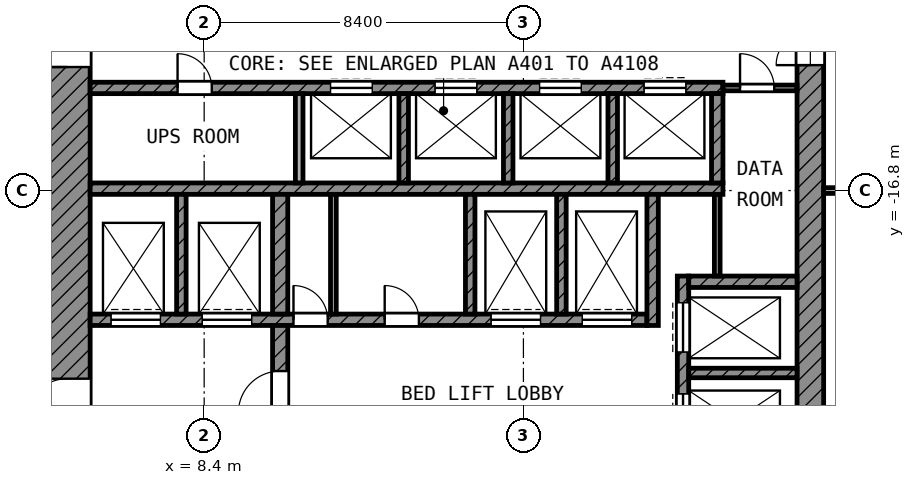
"""IFC4 building model, lengths in metres.
Left out: names, types, materials, properties, quantities, classifications, styles, units other than length and angle.
Written with IfcOpenShell. Run it as: python <this file> out.ifc"""

import sys

from ifc_helpers import new_model, si_unit, direction, frame, frame_2d, origin, place, context, subcontext, project, spatial, rectangle, extrude, element, fill, save


model = new_model("IFC4")
c1 = context("Model", 3, precision=1e-05, world=origin(), true_north=direction((0.0, 1.0)))
c2 = subcontext(c1, "Body", "Model", "MODEL_VIEW")
j1 = project(units=[si_unit("LENGTHUNIT", "METRE"), si_unit("PLANEANGLEUNIT", "RADIAN")], contexts=[c1])
p1 = place(None, origin())
s1 = spatial("IfcSite", under=j1, at=p1, CompositionType="ELEMENT")
p2 = place(p1, origin())
s2 = spatial("IfcBuilding", under=s1, at=p2, CompositionType="ELEMENT")
p3 = place(p2, frame((0.0, 0.0, 319.6)))
s3 = spatial("IfcBuildingStorey", under=s2, at=p3, CompositionType="ELEMENT", Elevation=319.6)
p4 = place(p3, frame((4.8, -24.7, 0.0), z_axis=(0.0, 0.0, 1.0), x_axis=(0.0, 1.0, 0.0)))
e1 = element("IfcWall", 1, at=p4, inside=s3, PredefinedType="SHEAR", context=c2, shape_type="SweptSolid", body=[
    extrude(rectangle(XDim=19.3, YDim=1.2, at=frame_2d((9.65, 0.0))), origin(), (0.0, 0.0, 1.0), 3.6),
])
p5 = place(p4, frame((11.15, 0.0, 0.0)))
e2 = element("IfcOpeningElement", 2, at=p5, cuts=e1, PredefinedType="OPENING", context=c2, shape_type="SweptSolid", body=[
    extrude(rectangle(XDim=1.1, YDim=2.1, at=frame_2d((0.55, 1.05))), frame((0.0, 0.61, 0.0), z_axis=(0.0, -1.0, 0.0), x_axis=(1.0, 0.0, 0.0)), (0.0, 0.0, 1.0), 1.22),
])
p6 = place(p4, frame((1.85, 0.0, 0.0)))
e3 = element("IfcOpeningElement", 3, at=p6, cuts=e1, PredefinedType="OPENING", context=c2, shape_type="SweptSolid", body=[
    extrude(rectangle(XDim=1.1, YDim=2.1, at=frame_2d((0.55, 1.05))), frame((0.0, 0.61, 0.0), z_axis=(0.0, -1.0, 0.0), x_axis=(1.0, 0.0, 0.0)), (0.0, 0.0, 1.0), 1.22),
])
p7 = place(p3, frame((24.35, -24.0, 0.0), z_axis=(0.0, 0.0, 1.0), x_axis=(0.0, 1.0, 0.0)))
e4 = element("IfcWall", 4, at=p7, inside=s3, PredefinedType="SHEAR", context=c2, shape_type="SweptSolid", body=[
    extrude(rectangle(XDim=18.6, YDim=0.7, at=frame_2d((9.3, 0.0))), origin(), (0.0, 0.0, 1.0), 3.6),
])
p8 = place(p7, frame((10.5, 0.0, 0.0)))
e5 = element("IfcOpeningElement", 5, at=p8, cuts=e4, PredefinedType="OPENING", context=c2, shape_type="SweptSolid", body=[
    extrude(rectangle(XDim=1.8, YDim=2.1, at=frame_2d((0.9, 1.05))), frame((0.0, 0.36, 0.0), z_axis=(0.0, -1.0, 0.0), x_axis=(1.0, 0.0, 0.0)), (0.0, 0.0, 1.0), 0.72),
])
p9 = place(p3, frame((5.4, -14.1, 0.0), z_axis=(0.0, 0.0, 1.0), x_axis=(1.0, 0.0, 0.0)))
e6 = element("IfcWall", 6, at=p9, inside=s3, PredefinedType="SHEAR", context=c2, shape_type="SweptSolid", body=[
    extrude(rectangle(XDim=16.65, YDim=0.3, at=frame_2d((8.325, 0.0))), origin(), (0.0, 0.0, 1.0), 3.6),
])
p10 = place(p9, frame((6.325, 0.0, 0.0)))
e7 = element("IfcOpeningElement", 7, at=p10, cuts=e6, PredefinedType="OPENING", context=c2, shape_type="SweptSolid", body=[
    extrude(rectangle(XDim=1.1, YDim=2.1, at=frame_2d((0.55, 1.05))), frame((0.0, 0.16, 0.0), z_axis=(0.0, -1.0, 0.0), x_axis=(1.0, 0.0, 0.0)), (0.0, 0.0, 1.0), 0.32),
])
p11 = place(p9, frame((9.075, 0.0, 0.0)))
e8 = element("IfcOpeningElement", 8, at=p11, cuts=e6, PredefinedType="OPENING", context=c2, shape_type="SweptSolid", body=[
    extrude(rectangle(XDim=1.1, YDim=2.1, at=frame_2d((0.55, 1.05))), frame((0.0, 0.16, 0.0), z_axis=(0.0, -1.0, 0.0), x_axis=(1.0, 0.0, 0.0)), (0.0, 0.0, 1.0), 0.32),
])
p12 = place(p9, frame((11.825, 0.0, 0.0)))
e9 = element("IfcOpeningElement", 9, at=p12, cuts=e6, PredefinedType="OPENING", context=c2, shape_type="SweptSolid", body=[
    extrude(rectangle(XDim=1.1, YDim=2.1, at=frame_2d((0.55, 1.05))), frame((0.0, 0.16, 0.0), z_axis=(0.0, -1.0, 0.0), x_axis=(1.0, 0.0, 0.0)), (0.0, 0.0, 1.0), 0.32),
])
p13 = place(p9, frame((14.575, 0.0, 0.0)))
e10 = element("IfcOpeningElement", 10, at=p13, cuts=e6, PredefinedType="OPENING", context=c2, shape_type="SweptSolid", body=[
    extrude(rectangle(XDim=1.1, YDim=2.1, at=frame_2d((0.55, 1.05))), frame((0.0, 0.16, 0.0), z_axis=(0.0, -1.0, 0.0), x_axis=(1.0, 0.0, 0.0)), (0.0, 0.0, 1.0), 0.32),
])
p14 = place(p9, frame((2.3, 0.0, 0.0)))
e11 = element("IfcOpeningElement", 11, at=p14, cuts=e6, PredefinedType="OPENING", context=c2, shape_type="SweptSolid", body=[
    extrude(rectangle(XDim=0.9, YDim=2.1, at=frame_2d((0.45, 1.05))), frame((0.0, 0.16, 0.0), z_axis=(0.0, -1.0, 0.0), x_axis=(1.0, 0.0, 0.0)), (0.0, 0.0, 1.0), 0.32),
])
p15 = place(p3, frame((5.4, -16.75, 0.0), z_axis=(0.0, 0.0, 1.0), x_axis=(1.0, 0.0, 0.0)))
e12 = element("IfcWall", 12, at=p15, inside=s3, PredefinedType="SHEAR", context=c2, shape_type="SweptSolid", body=[
    extrude(rectangle(XDim=16.65, YDim=0.3, at=frame_2d((8.325, 0.0))), origin(), (0.0, 0.0, 1.0), 3.6),
])
p16 = place(p3, frame((5.4, -20.2, 0.0), z_axis=(0.0, 0.0, 1.0), x_axis=(1.0, 0.0, 0.0)))
e13 = element("IfcWall", 13, at=p16, inside=s3, PredefinedType="SHEAR", context=c2, shape_type="SweptSolid", body=[
    extrude(rectangle(XDim=14.65, YDim=0.3, at=frame_2d((7.325, 0.0))), origin(), (0.0, 0.0, 1.0), 3.6),
])
p17 = place(p16, frame((10.55, 0.0, 0.0)))
e14 = element("IfcOpeningElement", 14, at=p17, cuts=e13, PredefinedType="OPENING", context=c2, shape_type="SweptSolid", body=[
    extrude(rectangle(XDim=1.3, YDim=2.1, at=frame_2d((0.65, 1.05))), frame((0.0, 0.16, 0.0), z_axis=(0.0, -1.0, 0.0), x_axis=(1.0, 0.0, 0.0)), (0.0, 0.0, 1.0), 0.32),
])
p18 = place(p16, frame((12.95, 0.0, 0.0)))
e15 = element("IfcOpeningElement", 15, at=p18, cuts=e13, PredefinedType="OPENING", context=c2, shape_type="SweptSolid", body=[
    extrude(rectangle(XDim=1.3, YDim=2.1, at=frame_2d((0.65, 1.05))), frame((0.0, 0.16, 0.0), z_axis=(0.0, -1.0, 0.0), x_axis=(1.0, 0.0, 0.0)), (0.0, 0.0, 1.0), 0.32),
])
p19 = place(p16, frame((0.55, 0.0, 0.0)))
e16 = element("IfcOpeningElement", 16, at=p19, cuts=e13, PredefinedType="OPENING", context=c2, shape_type="SweptSolid", body=[
    extrude(rectangle(XDim=1.3, YDim=2.1, at=frame_2d((0.65, 1.05))), frame((0.0, 0.16, 0.0), z_axis=(0.0, -1.0, 0.0), x_axis=(1.0, 0.0, 0.0)), (0.0, 0.0, 1.0), 0.32),
])
p20 = place(p16, frame((2.95, 0.0, 0.0)))
e17 = element("IfcOpeningElement", 17, at=p20, cuts=e13, PredefinedType="OPENING", context=c2, shape_type="SweptSolid", body=[
    extrude(rectangle(XDim=1.3, YDim=2.1, at=frame_2d((0.65, 1.05))), frame((0.0, 0.16, 0.0), z_axis=(0.0, -1.0, 0.0), x_axis=(1.0, 0.0, 0.0)), (0.0, 0.0, 1.0), 0.32),
])
p21 = place(p16, frame((5.35, 0.0, 0.0)))
e18 = element("IfcOpeningElement", 18, at=p21, cuts=e13, PredefinedType="OPENING", context=c2, shape_type="SweptSolid", body=[
    extrude(rectangle(XDim=0.9, YDim=2.1, at=frame_2d((0.45, 1.05))), frame((0.0, 0.16, 0.0), z_axis=(0.0, -1.0, 0.0), x_axis=(1.0, 0.0, 0.0)), (0.0, 0.0, 1.0), 0.32),
])
p22 = place(p16, frame((7.75, 0.0, 0.0)))
e19 = element("IfcOpeningElement", 19, at=p22, cuts=e13, PredefinedType="OPENING", context=c2, shape_type="SweptSolid", body=[
    extrude(rectangle(XDim=0.9, YDim=2.1, at=frame_2d((0.45, 1.05))), frame((0.0, 0.16, 0.0), z_axis=(0.0, -1.0, 0.0), x_axis=(1.0, 0.0, 0.0)), (0.0, 0.0, 1.0), 0.32),
])
p23 = place(p3, frame((10.4, -24.0, 0.0), z_axis=(0.0, 0.0, 1.0), x_axis=(0.0, 1.0, 0.0)))
e20 = element("IfcWall", 20, at=p23, inside=s3, PredefinedType="SHEAR", context=c2, shape_type="SweptSolid", body=[
    extrude(rectangle(XDim=3.65, YDim=0.4, at=frame_2d((1.825, 0.0))), origin(), (0.0, 0.0, 1.0), 3.6),
])
p24 = place(p23, frame((1.35, 0.0, 0.0)))
e21 = element("IfcOpeningElement", 21, at=p24, cuts=e20, PredefinedType="OPENING", context=c2, shape_type="SweptSolid", body=[
    extrude(rectangle(XDim=1.1, YDim=2.1, at=frame_2d((0.55, 1.05))), frame((0.0, 0.21, 0.0), z_axis=(0.0, -1.0, 0.0), x_axis=(1.0, 0.0, 0.0)), (0.0, 0.0, 1.0), 0.42),
])
p25 = place(p3, frame((10.4, -20.05, 0.0), z_axis=(0.0, 0.0, 1.0), x_axis=(0.0, 1.0, 0.0)))
e22 = element("IfcWall", 22, at=p25, inside=s3, PredefinedType="SHEAR", context=c2, shape_type="SweptSolid", body=[
    extrude(rectangle(XDim=3.15, YDim=0.4, at=frame_2d((1.575, 0.0))), origin(), (0.0, 0.0, 1.0), 3.6),
])
p26 = place(p3, frame((20.2, -20.35, 0.0), z_axis=(0.0, 0.0, 1.0), x_axis=(0.0, 1.0, 0.0)))
e23 = element("IfcWall", 23, at=p26, inside=s3, PredefinedType="SHEAR", context=c2, shape_type="SweptSolid", body=[
    extrude(rectangle(XDim=3.45, YDim=0.3, at=frame_2d((1.725, 0.0))), origin(), (0.0, 0.0, 1.0), 3.6),
])
p27 = place(p3, frame((21.9, -16.6, 0.0), z_axis=(0.0, 0.0, 1.0), x_axis=(0.0, 1.0, 0.0)))
e24 = element("IfcWall", 24, at=p27, inside=s3, PredefinedType="SHEAR", context=c2, shape_type="SweptSolid", body=[
    extrude(rectangle(XDim=2.35, YDim=0.3, at=frame_2d((1.175, 0.0))), origin(), (0.0, 0.0, 1.0), 3.6),
])
p28 = place(p3, frame((21.15, -19.2, 0.0), z_axis=(0.0, 0.0, 1.0), x_axis=(1.0, 0.0, 0.0)))
e25 = element("IfcWall", 25, at=p28, inside=s3, PredefinedType="SHEAR", context=c2, shape_type="SweptSolid", body=[
    extrude(rectangle(XDim=2.85, YDim=0.3, at=frame_2d((1.425, 0.0))), origin(), (0.0, 0.0, 1.0), 3.6),
])
p29 = place(p3, frame((21.0, -24.0, 0.0), z_axis=(0.0, 0.0, 1.0), x_axis=(0.0, 1.0, 0.0)))
e26 = element("IfcWall", 26, at=p29, inside=s3, PredefinedType="SHEAR", context=c2, shape_type="SweptSolid", body=[
    extrude(rectangle(XDim=4.95, YDim=0.3, at=frame_2d((2.475, 0.0))), origin(), (0.0, 0.0, 1.0), 3.6),
])
p30 = place(p29, frame((2.95, 0.0, 0.0)))
e27 = element("IfcOpeningElement", 27, at=p30, cuts=e26, PredefinedType="OPENING", context=c2, shape_type="SweptSolid", body=[
    extrude(rectangle(XDim=1.3, YDim=2.1, at=frame_2d((0.65, 1.05))), frame((0.0, 0.16, 0.0), z_axis=(0.0, -1.0, 0.0), x_axis=(1.0, 0.0, 0.0)), (0.0, 0.0, 1.0), 0.32),
])
p31 = place(p29, frame((0.55, 0.0, 0.0)))
e28 = element("IfcOpeningElement", 28, at=p31, cuts=e26, PredefinedType="OPENING", context=c2, shape_type="SweptSolid", body=[
    extrude(rectangle(XDim=1.3, YDim=2.1, at=frame_2d((0.65, 1.05))), frame((0.0, 0.16, 0.0), z_axis=(0.0, -1.0, 0.0), x_axis=(1.0, 0.0, 0.0)), (0.0, 0.0, 1.0), 0.32),
])
p32 = place(p3, frame((21.15, -21.6, 0.0), z_axis=(0.0, 0.0, 1.0), x_axis=(1.0, 0.0, 0.0)))
e29 = element("IfcWall", 29, at=p32, inside=s3, PredefinedType="SHEAR", context=c2, shape_type="SweptSolid", body=[
    extrude(rectangle(XDim=2.85, YDim=0.25, at=frame_2d((1.425, 0.0))), origin(), (0.0, 0.0, 1.0), 3.6),
])
for number, where, z_axis, x_axis in (
    (30, (7.8, -20.05, 0.0), (0.0, 0.0, 1.0), (0.0, 1.0, 0.0)),
    (31, (15.4, -20.05, 0.0), (0.0, 0.0, 1.0), (0.0, 1.0, 0.0)),
    (32, (17.8, -20.05, 0.0), (0.0, 0.0, 1.0), (0.0, 1.0, 0.0)),
):
    element("IfcWall", number, at=place(p3, frame(where, z_axis=z_axis, x_axis=x_axis)), inside=s3, PredefinedType="SHEAR", context=c2, shape_type="SweptSolid", body=[
        extrude(rectangle(XDim=3.15, YDim=0.25, at=frame_2d((1.575, 0.0))), origin(), (0.0, 0.0, 1.0), 3.6),
    ])
p33 = place(p3, frame((10.9, -16.6, 0.0), z_axis=(0.0, 0.0, 1.0), x_axis=(0.0, 1.0, 0.0)))
e33 = element("IfcWall", 33, at=p33, inside=s3, PredefinedType="PARTITIONING", context=c2, shape_type="SweptSolid", body=[
    extrude(rectangle(XDim=2.35, YDim=0.2, at=frame_2d((1.175, 0.0))), origin(), (0.0, 0.0, 1.0), 3.6),
])
for number, where, z_axis, x_axis in (
    (34, (13.65, -16.6, 0.0), (0.0, 0.0, 1.0), (0.0, 1.0, 0.0)),
    (35, (16.4, -16.6, 0.0), (0.0, 0.0, 1.0), (0.0, 1.0, 0.0)),
    (36, (19.15, -16.6, 0.0), (0.0, 0.0, 1.0), (0.0, 1.0, 0.0)),
):
    element("IfcWall", number, at=place(p3, frame(where, z_axis=z_axis, x_axis=x_axis)), inside=s3, PredefinedType="SHEAR", context=c2, shape_type="SweptSolid", body=[
        extrude(rectangle(XDim=2.35, YDim=0.25, at=frame_2d((1.175, 0.0))), origin(), (0.0, 0.0, 1.0), 3.6),
    ])
p34 = place(p3, frame((21.9, -19.05, 0.0), z_axis=(0.0, 0.0, 1.0), x_axis=(0.0, 1.0, 0.0)))
e37 = element("IfcWall", 37, at=p34, inside=s3, PredefinedType="PARTITIONING", context=c2, shape_type="SweptSolid", body=[
    extrude(rectangle(XDim=2.15, YDim=0.15, at=frame_2d((1.075, 0.0))), origin(), (0.0, 0.0, 1.0), 3.6),
])
p35 = place(p3, frame((22.05, -14.1, 0.0), z_axis=(0.0, 0.0, 1.0), x_axis=(1.0, 0.0, 0.0)))
e38 = element("IfcWall", 38, at=p35, inside=s3, PredefinedType="PARTITIONING", context=c2, shape_type="SweptSolid", body=[
    extrude(rectangle(XDim=1.95, YDim=0.15, at=frame_2d((0.975, 0.0))), origin(), (0.0, 0.0, 1.0), 3.6),
])
p36 = place(p35, frame((0.45, 0.0, 0.0)))
e39 = element("IfcOpeningElement", 39, at=p36, cuts=e38, PredefinedType="OPENING", context=c2, shape_type="SweptSolid", body=[
    extrude(rectangle(XDim=0.9, YDim=2.1, at=frame_2d((0.45, 1.05))), frame((0.0, 0.085, 0.0), z_axis=(0.0, -1.0, 0.0), x_axis=(1.0, 0.0, 0.0)), (0.0, 0.0, 1.0), 0.17),
])
p37 = place(p3, frame((11.8, -20.05, 0.0), z_axis=(0.0, 0.0, 1.0), x_axis=(0.0, 1.0, 0.0)))
e40 = element("IfcWall", 40, at=p37, inside=s3, PredefinedType="PARTITIONING", context=c2, shape_type="SweptSolid", body=[
    extrude(rectangle(XDim=3.15, YDim=0.15, at=frame_2d((1.575, 0.0))), origin(), (0.0, 0.0, 1.0), 3.6),
])
p38 = place(p3, frame((24.7, -16.8, 0.0), z_axis=(0.0, 0.0, 1.0), x_axis=(1.0, 0.0, 0.0)))
e41 = element("IfcWall", 41, at=p38, inside=s3, PredefinedType="PARTITIONING", context=c2, shape_type="SweptSolid", body=[
    extrude(rectangle(XDim=34.02, YDim=0.15, at=frame_2d((17.01, 0.0))), origin(), (0.0, 0.0, 1.0), 3.6),
])
p39 = place(p38, frame((1.85, 0.0, 0.0)))
e42 = element("IfcOpeningElement", 42, at=p39, cuts=e41, PredefinedType="OPENING", context=c2, shape_type="SweptSolid", body=[
    extrude(rectangle(XDim=1.5, YDim=2.1, at=frame_2d((0.75, 1.05))), frame((0.0, 0.085, 0.0), z_axis=(0.0, -1.0, 0.0), x_axis=(1.0, 0.0, 0.0)), (0.0, 0.0, 1.0), 0.17),
])
p40 = place(p38, frame((6.2, 0.0, 0.0)))
e43 = element("IfcOpeningElement", 43, at=p40, cuts=e41, PredefinedType="OPENING", context=c2, shape_type="SweptSolid", body=[
    extrude(rectangle(XDim=1.2, YDim=2.1, at=frame_2d((0.6, 1.05))), frame((0.0, 0.085, 0.0), z_axis=(0.0, -1.0, 0.0), x_axis=(1.0, 0.0, 0.0)), (0.0, 0.0, 1.0), 0.17),
])
p41 = place(p38, frame((10.35, 0.0, 0.0)))
e44 = element("IfcOpeningElement", 44, at=p41, cuts=e41, PredefinedType="OPENING", context=c2, shape_type="SweptSolid", body=[
    extrude(rectangle(XDim=1.0, YDim=2.1, at=frame_2d((0.5, 1.05))), frame((0.0, 0.085, 0.0), z_axis=(0.0, -1.0, 0.0), x_axis=(1.0, 0.0, 0.0)), (0.0, 0.0, 1.0), 0.17),
])
p42 = place(p38, frame((20.0, 0.0, 0.0)))
e45 = element("IfcOpeningElement", 45, at=p42, cuts=e41, PredefinedType="OPENING", context=c2, shape_type="SweptSolid", body=[
    extrude(rectangle(XDim=1.2, YDim=2.1, at=frame_2d((0.6, 1.05))), frame((0.0, 0.085, 0.0), z_axis=(0.0, -1.0, 0.0), x_axis=(1.0, 0.0, 0.0)), (0.0, 0.0, 1.0), 0.17),
])
p43 = place(p38, frame((18.4, 0.0, 0.0)))
e46 = element("IfcOpeningElement", 46, at=p43, cuts=e41, PredefinedType="OPENING", context=c2, shape_type="SweptSolid", body=[
    extrude(rectangle(XDim=1.2, YDim=2.1, at=frame_2d((0.6, 1.05))), frame((0.0, 0.085, 0.0), z_axis=(0.0, -1.0, 0.0), x_axis=(1.0, 0.0, 0.0)), (0.0, 0.0, 1.0), 0.17),
])
p44 = place(p38, frame((23.1, 0.0, 0.0)))
e47 = element("IfcOpeningElement", 47, at=p44, cuts=e41, PredefinedType="OPENING", context=c2, shape_type="SweptSolid", body=[
    extrude(rectangle(XDim=1.0, YDim=2.1, at=frame_2d((0.5, 1.05))), frame((0.0, 0.085, 0.0), z_axis=(0.0, -1.0, 0.0), x_axis=(1.0, 0.0, 0.0)), (0.0, 0.0, 1.0), 0.17),
])
p45 = place(p38, frame((29.15, 0.0, 0.0)))
e48 = element("IfcOpeningElement", 48, at=p45, cuts=e41, PredefinedType="OPENING", context=c2, shape_type="SweptSolid", body=[
    extrude(rectangle(XDim=1.5, YDim=2.1, at=frame_2d((0.75, 1.05))), frame((0.0, 0.085, 0.0), z_axis=(0.0, -1.0, 0.0), x_axis=(1.0, 0.0, 0.0)), (0.0, 0.0, 1.0), 0.17),
])
p46 = place(p10, origin())
e49 = element("IfcDoor", 49, at=p46, inside=s3, OperationType="DOUBLE_DOOR_SLIDING", PredefinedType="DOOR", context=c2, shape_type="SweptSolid", body=[
    extrude(rectangle(XDim=1.1, YDim=2.1, at=frame_2d((0.55, 1.05))), frame((0.0, 0.025, 0.0), z_axis=(0.0, -1.0, 0.0), x_axis=(1.0, 0.0, 0.0)), (0.0, 0.0, 1.0), 0.05),
])
fill(e7, e49)
p47 = place(p11, origin())
e50 = element("IfcDoor", 50, at=p47, inside=s3, OperationType="DOUBLE_DOOR_SLIDING", PredefinedType="DOOR", context=c2, shape_type="SweptSolid", body=[
    extrude(rectangle(XDim=1.1, YDim=2.1, at=frame_2d((0.55, 1.05))), frame((0.0, 0.025, 0.0), z_axis=(0.0, -1.0, 0.0), x_axis=(1.0, 0.0, 0.0)), (0.0, 0.0, 1.0), 0.05),
])
fill(e8, e50)
p48 = place(p12, origin())
e51 = element("IfcDoor", 51, at=p48, inside=s3, OperationType="DOUBLE_DOOR_SLIDING", PredefinedType="DOOR", context=c2, shape_type="SweptSolid", body=[
    extrude(rectangle(XDim=1.1, YDim=2.1, at=frame_2d((0.55, 1.05))), frame((0.0, 0.025, 0.0), z_axis=(0.0, -1.0, 0.0), x_axis=(1.0, 0.0, 0.0)), (0.0, 0.0, 1.0), 0.05),
])
fill(e9, e51)
p49 = place(p13, origin())
e52 = element("IfcDoor", 52, at=p49, inside=s3, OperationType="DOUBLE_DOOR_SLIDING", PredefinedType="DOOR", context=c2, shape_type="SweptSolid", body=[
    extrude(rectangle(XDim=1.1, YDim=2.1, at=frame_2d((0.55, 1.05))), frame((0.0, 0.025, 0.0), z_axis=(0.0, -1.0, 0.0), x_axis=(1.0, 0.0, 0.0)), (0.0, 0.0, 1.0), 0.05),
])
fill(e10, e52)
p50 = place(p30, origin())
e53 = element("IfcDoor", 53, at=p50, inside=s3, OperationType="DOUBLE_DOOR_SLIDING", PredefinedType="DOOR", context=c2, shape_type="SweptSolid", body=[
    extrude(rectangle(XDim=1.3, YDim=2.1, at=frame_2d((0.65, 1.05))), frame((0.0, 0.025, 0.0), z_axis=(0.0, -1.0, 0.0), x_axis=(1.0, 0.0, 0.0)), (0.0, 0.0, 1.0), 0.05),
])
fill(e27, e53)
p51 = place(p31, origin())
e54 = element("IfcDoor", 54, at=p51, inside=s3, OperationType="DOUBLE_DOOR_SLIDING", PredefinedType="DOOR", context=c2, shape_type="SweptSolid", body=[
    extrude(rectangle(XDim=1.3, YDim=2.1, at=frame_2d((0.65, 1.05))), frame((0.0, 0.025, 0.0), z_axis=(0.0, -1.0, 0.0), x_axis=(1.0, 0.0, 0.0)), (0.0, 0.0, 1.0), 0.05),
])
fill(e28, e54)
p52 = place(p17, origin())
e55 = element("IfcDoor", 55, at=p52, inside=s3, OperationType="DOUBLE_DOOR_SLIDING", PredefinedType="DOOR", context=c2, shape_type="SweptSolid", body=[
    extrude(rectangle(XDim=1.3, YDim=2.1, at=frame_2d((0.65, 1.05))), frame((0.0, 0.025, 0.0), z_axis=(0.0, -1.0, 0.0), x_axis=(1.0, 0.0, 0.0)), (0.0, 0.0, 1.0), 0.05),
])
fill(e14, e55)
p53 = place(p18, origin())
e56 = element("IfcDoor", 56, at=p53, inside=s3, OperationType="DOUBLE_DOOR_SLIDING", PredefinedType="DOOR", context=c2, shape_type="SweptSolid", body=[
    extrude(rectangle(XDim=1.3, YDim=2.1, at=frame_2d((0.65, 1.05))), frame((0.0, 0.025, 0.0), z_axis=(0.0, -1.0, 0.0), x_axis=(1.0, 0.0, 0.0)), (0.0, 0.0, 1.0), 0.05),
])
fill(e15, e56)
p54 = place(p19, origin())
e57 = element("IfcDoor", 57, at=p54, inside=s3, OperationType="DOUBLE_DOOR_SLIDING", PredefinedType="DOOR", context=c2, shape_type="SweptSolid", body=[
    extrude(rectangle(XDim=1.3, YDim=2.1, at=frame_2d((0.65, 1.05))), frame((0.0, 0.025, 0.0), z_axis=(0.0, -1.0, 0.0), x_axis=(1.0, 0.0, 0.0)), (0.0, 0.0, 1.0), 0.05),
])
fill(e16, e57)
p55 = place(p20, origin())
e58 = element("IfcDoor", 58, at=p55, inside=s3, OperationType="DOUBLE_DOOR_SLIDING", PredefinedType="DOOR", context=c2, shape_type="SweptSolid", body=[
    extrude(rectangle(XDim=1.3, YDim=2.1, at=frame_2d((0.65, 1.05))), frame((0.0, 0.025, 0.0), z_axis=(0.0, -1.0, 0.0), x_axis=(1.0, 0.0, 0.0)), (0.0, 0.0, 1.0), 0.05),
])
fill(e17, e58)
p56 = place(p5, origin())
e59 = element("IfcDoor", 59, at=p56, inside=s3, OperationType="SINGLE_SWING_LEFT", PredefinedType="DOOR", context=c2, shape_type="SweptSolid", body=[
    extrude(rectangle(XDim=1.1, YDim=2.1, at=frame_2d((0.55, 1.05))), frame((0.0, 0.025, 0.0), z_axis=(0.0, -1.0, 0.0), x_axis=(1.0, 0.0, 0.0)), (0.0, 0.0, 1.0), 0.05),
])
fill(e2, e59)
p57 = place(p6, origin())
e60 = element("IfcDoor", 60, at=p57, inside=s3, OperationType="SINGLE_SWING_LEFT", PredefinedType="DOOR", context=c2, shape_type="SweptSolid", body=[
    extrude(rectangle(XDim=1.1, YDim=2.1, at=frame_2d((0.55, 1.05))), frame((0.0, 0.025, 0.0), z_axis=(0.0, -1.0, 0.0), x_axis=(1.0, 0.0, 0.0)), (0.0, 0.0, 1.0), 0.05),
])
fill(e3, e60)
p58 = place(p24, origin())
e61 = element("IfcDoor", 61, at=p58, inside=s3, OperationType="SINGLE_SWING_LEFT", PredefinedType="DOOR", context=c2, shape_type="SweptSolid", body=[
    extrude(rectangle(XDim=1.1, YDim=2.1, at=frame_2d((0.55, 1.05))), frame((0.0, 0.025, 0.0), z_axis=(0.0, -1.0, 0.0), x_axis=(1.0, 0.0, 0.0)), (0.0, 0.0, 1.0), 0.05),
])
fill(e21, e61)
p59 = place(p8, origin())
e62 = element("IfcDoor", 62, at=p59, inside=s3, OperationType="DOUBLE_DOOR_SINGLE_SWING", PredefinedType="DOOR", context=c2, shape_type="SweptSolid", body=[
    extrude(rectangle(XDim=1.8, YDim=2.1, at=frame_2d((0.9, 1.05))), frame((0.0, 0.025, 0.0), z_axis=(0.0, -1.0, 0.0), x_axis=(1.0, 0.0, 0.0)), (0.0, 0.0, 1.0), 0.05),
])
fill(e5, e62)
p60 = place(p36, origin())
e63 = element("IfcDoor", 63, at=p60, inside=s3, OperationType="SINGLE_SWING_LEFT", PredefinedType="DOOR", context=c2, shape_type="SweptSolid", body=[
    extrude(rectangle(XDim=0.9, YDim=2.1, at=frame_2d((0.45, 1.05))), frame((0.0, 0.025, 0.0), z_axis=(0.0, -1.0, 0.0), x_axis=(1.0, 0.0, 0.0)), (0.0, 0.0, 1.0), 0.05),
])
fill(e39, e63)
p61 = place(p21, origin())
e64 = element("IfcDoor", 64, at=p61, inside=s3, OperationType="SINGLE_SWING_LEFT", PredefinedType="DOOR", context=c2, shape_type="SweptSolid", body=[
    extrude(rectangle(XDim=0.9, YDim=2.1, at=frame_2d((0.45, 1.05))), frame((0.0, 0.025, 0.0), z_axis=(0.0, -1.0, 0.0), x_axis=(1.0, 0.0, 0.0)), (0.0, 0.0, 1.0), 0.05),
])
fill(e18, e64)
p62 = place(p22, origin())
e65 = element("IfcDoor", 65, at=p62, inside=s3, OperationType="SINGLE_SWING_LEFT", PredefinedType="DOOR", context=c2, shape_type="SweptSolid", body=[
    extrude(rectangle(XDim=0.9, YDim=2.1, at=frame_2d((0.45, 1.05))), frame((0.0, 0.025, 0.0), z_axis=(0.0, -1.0, 0.0), x_axis=(1.0, 0.0, 0.0)), (0.0, 0.0, 1.0), 0.05),
])
fill(e19, e65)
p63 = place(p14, origin())
e66 = element("IfcDoor", 66, at=p63, inside=s3, OperationType="SINGLE_SWING_LEFT", PredefinedType="DOOR", context=c2, shape_type="SweptSolid", body=[
    extrude(rectangle(XDim=0.9, YDim=2.1, at=frame_2d((0.45, 1.05))), frame((0.0, 0.025, 0.0), z_axis=(0.0, -1.0, 0.0), x_axis=(1.0, 0.0, 0.0)), (0.0, 0.0, 1.0), 0.05),
])
fill(e11, e66)
save(model, sys.argv[1])
